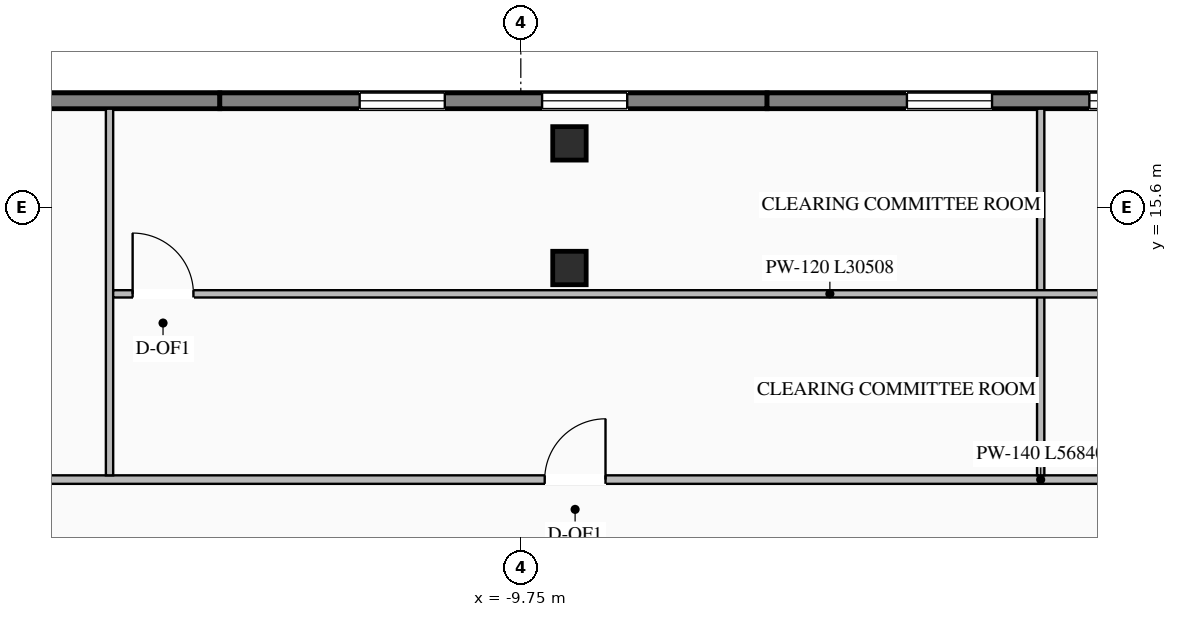
"""IFC4 building model, lengths in metres.
Left out: names, types, materials, properties, quantities, classifications, styles, units other than length and angle.
Written with IfcOpenShell. Run it as: python <this file> out.ifc"""

import sys

from ifc_helpers import new_model, si_unit, direction, frame, frame_2d, origin, origin_2d, place, context, subcontext, project, spatial, rectangle, i_section, extrude, element, fill, save


model = new_model("IFC4")
c1 = context("Model", 3, precision=1e-05, world=origin(), true_north=direction((0.0, 1.0)))
c2 = subcontext(c1, "Body", "Model", "MODEL_VIEW")
j1 = project(units=[si_unit("LENGTHUNIT", "METRE"), si_unit("PLANEANGLEUNIT", "RADIAN")], contexts=[c1])
p1 = place(None, origin())
s1 = spatial("IfcSite", under=j1, at=p1, CompositionType="ELEMENT")
p2 = place(p1, origin())
s2 = spatial("IfcBuilding", under=s1, at=p2, CompositionType="ELEMENT")
p3 = place(p2, frame((0.0, 0.0, 229.2)))
s3 = spatial("IfcBuildingStorey", under=s2, at=p3, CompositionType="ELEMENT", Elevation=229.2)
for number, where, z_axis, x_axis in (
    (1, (-8.95, 14.6, 0.0), (0.0, 0.0, 1.0), (1.0, 0.0, 0.0)),
    (2, (-8.95, 16.65, 0.0), (0.0, 0.0, 1.0), (1.0, 0.0, 0.0)),
):
    element("IfcColumn", number, at=place(p3, frame(where, z_axis=z_axis, x_axis=x_axis)), inside=s3, PredefinedType="COLUMN", context=c2, shape_type="SweptSolid", body=[
        extrude(i_section(OverallWidth=0.55, OverallDepth=0.55, WebThickness=0.024, FlangeThickness=0.036, at=origin_2d()), origin(), (0.0, 0.0, 1.0), 3.45),
    ])
p4 = place(p3, frame((-27.35, 17.35, 0.0), z_axis=(0.0, 0.0, 1.0), x_axis=(1.0, 0.0, 0.0)))
e3 = element("IfcWall", 3, at=p4, inside=s3, PredefinedType="STANDARD", context=c2, shape_type="SweptSolid", body=[
    extrude(rectangle(XDim=12.65, YDim=0.26, at=frame_2d((6.325, 0.0))), origin(), (0.0, 0.0, 1.0), 3.25),
])
p5 = place(p4, frame((3.517, 0.0, 0.76)))
e4 = element("IfcOpeningElement", 4, at=p5, cuts=e3, PredefinedType="OPENING", context=c2, shape_type="SweptSolid", body=[
    extrude(rectangle(XDim=1.4, YDim=1.95, at=frame_2d((0.7, 0.975))), frame((0.0, 0.14, 0.0), z_axis=(0.0, -1.0, 0.0), x_axis=(1.0, 0.0, 0.0)), (0.0, 0.0, 1.0), 0.28),
])
p6 = place(p4, frame((7.733, 0.0, 0.76)))
e5 = element("IfcOpeningElement", 5, at=p6, cuts=e3, PredefinedType="OPENING", context=c2, shape_type="SweptSolid", body=[
    extrude(rectangle(XDim=1.4, YDim=1.95, at=frame_2d((0.7, 0.975))), frame((0.0, 0.14, 0.0), z_axis=(0.0, -1.0, 0.0), x_axis=(1.0, 0.0, 0.0)), (0.0, 0.0, 1.0), 0.28),
])
p7 = place(p3, frame((-14.7, 17.35, 0.0), z_axis=(0.0, 0.0, 1.0), x_axis=(1.0, 0.0, 0.0)))
e6 = element("IfcWall", 6, at=p7, inside=s3, PredefinedType="STANDARD", context=c2, shape_type="SweptSolid", body=[
    extrude(rectangle(XDim=9.0, YDim=0.26, at=frame_2d((4.5, 0.0))), origin(), (0.0, 0.0, 1.0), 3.25),
])
p8 = place(p7, frame((2.3, 0.0, 0.76)))
e7 = element("IfcOpeningElement", 7, at=p8, cuts=e6, PredefinedType="OPENING", context=c2, shape_type="SweptSolid", body=[
    extrude(rectangle(XDim=1.4, YDim=1.95, at=frame_2d((0.7, 0.975))), frame((0.0, 0.14, 0.0), z_axis=(0.0, -1.0, 0.0), x_axis=(1.0, 0.0, 0.0)), (0.0, 0.0, 1.0), 0.28),
])
p9 = place(p7, frame((5.3, 0.0, 0.76)))
e8 = element("IfcOpeningElement", 8, at=p9, cuts=e6, PredefinedType="OPENING", context=c2, shape_type="SweptSolid", body=[
    extrude(rectangle(XDim=1.4, YDim=1.95, at=frame_2d((0.7, 0.975))), frame((0.0, 0.14, 0.0), z_axis=(0.0, -1.0, 0.0), x_axis=(1.0, 0.0, 0.0)), (0.0, 0.0, 1.0), 0.28),
])
p10 = place(p3, frame((-5.7, 17.35, 0.0), z_axis=(0.0, 0.0, 1.0), x_axis=(1.0, 0.0, 0.0)))
e9 = element("IfcWall", 9, at=p10, inside=s3, PredefinedType="STANDARD", context=c2, shape_type="SweptSolid", body=[
    extrude(rectangle(XDim=9.0, YDim=0.26, at=frame_2d((4.5, 0.0))), origin(), (0.0, 0.0, 1.0), 3.25),
])
p11 = place(p10, frame((2.3, 0.0, 0.76)))
e10 = element("IfcOpeningElement", 10, at=p11, cuts=e9, PredefinedType="OPENING", context=c2, shape_type="SweptSolid", body=[
    extrude(rectangle(XDim=1.4, YDim=1.95, at=frame_2d((0.7, 0.975))), frame((0.0, 0.14, 0.0), z_axis=(0.0, -1.0, 0.0), x_axis=(1.0, 0.0, 0.0)), (0.0, 0.0, 1.0), 0.28),
])
p12 = place(p10, frame((5.3, 0.0, 0.76)))
e11 = element("IfcOpeningElement", 11, at=p12, cuts=e9, PredefinedType="OPENING", context=c2, shape_type="SweptSolid", body=[
    extrude(rectangle(XDim=1.4, YDim=1.95, at=frame_2d((0.7, 0.975))), frame((0.0, 0.14, 0.0), z_axis=(0.0, -1.0, 0.0), x_axis=(1.0, 0.0, 0.0)), (0.0, 0.0, 1.0), 0.28),
])
p13 = place(p3, frame((-29.62, 11.12, 0.0), z_axis=(0.0, 0.0, 1.0), x_axis=(1.0, 0.0, 0.0)))
e12 = element("IfcWall", 12, at=p13, inside=s3, PredefinedType="STANDARD", context=c2, shape_type="SweptSolid", body=[
    extrude(rectangle(XDim=56.84, YDim=0.14, at=frame_2d((28.42, 0.0))), origin(), (0.0, 0.0, 1.0), 3.25),
])
p14 = place(p13, frame((6.179, 0.0, 0.0)))
e13 = element("IfcOpeningElement", 13, at=p14, cuts=e12, PredefinedType="OPENING", context=c2, shape_type="SweptSolid", body=[
    extrude(rectangle(XDim=1.0, YDim=2.08, at=frame_2d((0.5, 1.04))), frame((0.0, 0.08, 0.0), z_axis=(0.0, -1.0, 0.0), x_axis=(1.0, 0.0, 0.0)), (0.0, 0.0, 1.0), 0.16),
])
p15 = place(p13, frame((20.263, 0.0, 0.0)))
e14 = element("IfcOpeningElement", 14, at=p15, cuts=e12, PredefinedType="OPENING", context=c2, shape_type="SweptSolid", body=[
    extrude(rectangle(XDim=1.0, YDim=2.08, at=frame_2d((0.5, 1.04))), frame((0.0, 0.08, 0.0), z_axis=(0.0, -1.0, 0.0), x_axis=(1.0, 0.0, 0.0)), (0.0, 0.0, 1.0), 0.16),
])
p16 = place(p13, frame((35.577, 0.0, 0.0)))
e15 = element("IfcOpeningElement", 15, at=p16, cuts=e12, PredefinedType="OPENING", context=c2, shape_type="SweptSolid", body=[
    extrude(rectangle(XDim=1.0, YDim=2.08, at=frame_2d((0.5, 1.04))), frame((0.0, 0.08, 0.0), z_axis=(0.0, -1.0, 0.0), x_axis=(1.0, 0.0, 0.0)), (0.0, 0.0, 1.0), 0.16),
])
p17 = place(p13, frame((49.661, 0.0, 0.0)))
e16 = element("IfcOpeningElement", 16, at=p17, cuts=e12, PredefinedType="OPENING", context=c2, shape_type="SweptSolid", body=[
    extrude(rectangle(XDim=1.0, YDim=2.08, at=frame_2d((0.5, 1.04))), frame((0.0, 0.08, 0.0), z_axis=(0.0, -1.0, 0.0), x_axis=(1.0, 0.0, 0.0)), (0.0, 0.0, 1.0), 0.16),
])
for number, where, z_axis, x_axis in (
    (17, (-16.514, 11.19, 0.0), (0.0, 0.0, 1.0), (0.0, 1.0, 0.0)),
    (18, (-1.2, 11.19, 0.0), (0.0, 0.0, 1.0), (0.0, 1.0, 0.0)),
):
    element("IfcWall", number, at=place(p3, frame(where, z_axis=z_axis, x_axis=x_axis)), inside=s3, PredefinedType="STANDARD", context=c2, shape_type="SweptSolid", body=[
        extrude(rectangle(XDim=6.03, YDim=0.12, at=frame_2d((3.015, 0.0))), origin(), (0.0, 0.0, 1.0), 3.25),
    ])
p18 = place(p3, frame((-16.454, 14.175, 0.0), z_axis=(0.0, 0.0, 1.0), x_axis=(1.0, 0.0, 0.0)))
e19 = element("IfcWall", 19, at=p18, inside=s3, PredefinedType="STANDARD", context=c2, shape_type="SweptSolid", body=[
    extrude(rectangle(XDim=30.508, YDim=0.12, at=frame_2d((15.254, 0.0))), origin(), (0.0, 0.0, 1.0), 3.25),
])
p19 = place(p18, frame((0.32, 0.0, 0.0)))
e20 = element("IfcOpeningElement", 20, at=p19, cuts=e19, PredefinedType="OPENING", context=c2, shape_type="SweptSolid", body=[
    extrude(rectangle(XDim=1.0, YDim=2.08, at=frame_2d((0.5, 1.04))), frame((0.0, 0.07, 0.0), z_axis=(0.0, -1.0, 0.0), x_axis=(1.0, 0.0, 0.0)), (0.0, 0.0, 1.0), 0.14),
])
p20 = place(p18, frame((22.254, 0.0, 0.0)))
e21 = element("IfcOpeningElement", 21, at=p20, cuts=e19, PredefinedType="OPENING", context=c2, shape_type="SweptSolid", body=[
    extrude(rectangle(XDim=1.0, YDim=2.08, at=frame_2d((0.5, 1.04))), frame((0.0, 0.07, 0.0), z_axis=(0.0, -1.0, 0.0), x_axis=(1.0, 0.0, 0.0)), (0.0, 0.0, 1.0), 0.14),
])
p21 = place(p8, origin())
e22 = element("IfcWindow", 22, at=p21, inside=s3, PartitioningType="SINGLE_PANEL", PredefinedType="WINDOW", context=c2, shape_type="SweptSolid", body=[
    extrude(rectangle(XDim=1.4, YDim=1.95, at=frame_2d((0.7, 0.975))), frame((0.0, 0.03, 0.0), z_axis=(0.0, -1.0, 0.0), x_axis=(1.0, 0.0, 0.0)), (0.0, 0.0, 1.0), 0.06),
])
fill(e7, e22)
p22 = place(p9, origin())
e23 = element("IfcWindow", 23, at=p22, inside=s3, PartitioningType="SINGLE_PANEL", PredefinedType="WINDOW", context=c2, shape_type="SweptSolid", body=[
    extrude(rectangle(XDim=1.4, YDim=1.95, at=frame_2d((0.7, 0.975))), frame((0.0, 0.03, 0.0), z_axis=(0.0, -1.0, 0.0), x_axis=(1.0, 0.0, 0.0)), (0.0, 0.0, 1.0), 0.06),
])
fill(e8, e23)
p23 = place(p11, origin())
e24 = element("IfcWindow", 24, at=p23, inside=s3, PartitioningType="SINGLE_PANEL", PredefinedType="WINDOW", context=c2, shape_type="SweptSolid", body=[
    extrude(rectangle(XDim=1.4, YDim=1.95, at=frame_2d((0.7, 0.975))), frame((0.0, 0.03, 0.0), z_axis=(0.0, -1.0, 0.0), x_axis=(1.0, 0.0, 0.0)), (0.0, 0.0, 1.0), 0.06),
])
fill(e10, e24)
p24 = place(p12, origin())
e25 = element("IfcWindow", 25, at=p24, inside=s3, PartitioningType="SINGLE_PANEL", PredefinedType="WINDOW", context=c2, shape_type="SweptSolid", body=[
    extrude(rectangle(XDim=1.4, YDim=1.95, at=frame_2d((0.7, 0.975))), frame((0.0, 0.03, 0.0), z_axis=(0.0, -1.0, 0.0), x_axis=(1.0, 0.0, 0.0)), (0.0, 0.0, 1.0), 0.06),
])
fill(e11, e25)
p25 = place(p15, origin())
e26 = element("IfcDoor", 26, at=p25, inside=s3, OperationType="SINGLE_SWING_RIGHT", PredefinedType="DOOR", context=c2, shape_type="SweptSolid", body=[
    extrude(rectangle(XDim=1.0, YDim=2.08, at=frame_2d((0.5, 1.04))), frame((0.0, 0.025, 0.0), z_axis=(0.0, -1.0, 0.0), x_axis=(1.0, 0.0, 0.0)), (0.0, 0.0, 1.0), 0.05),
])
fill(e14, e26)
p26 = place(p19, origin())
e27 = element("IfcDoor", 27, at=p26, inside=s3, OperationType="SINGLE_SWING_LEFT", PredefinedType="DOOR", context=c2, shape_type="SweptSolid", body=[
    extrude(rectangle(XDim=1.0, YDim=2.08, at=frame_2d((0.5, 1.04))), frame((0.0, 0.025, 0.0), z_axis=(0.0, -1.0, 0.0), x_axis=(1.0, 0.0, 0.0)), (0.0, 0.0, 1.0), 0.05),
])
fill(e20, e27)
save(model, sys.argv[1])
